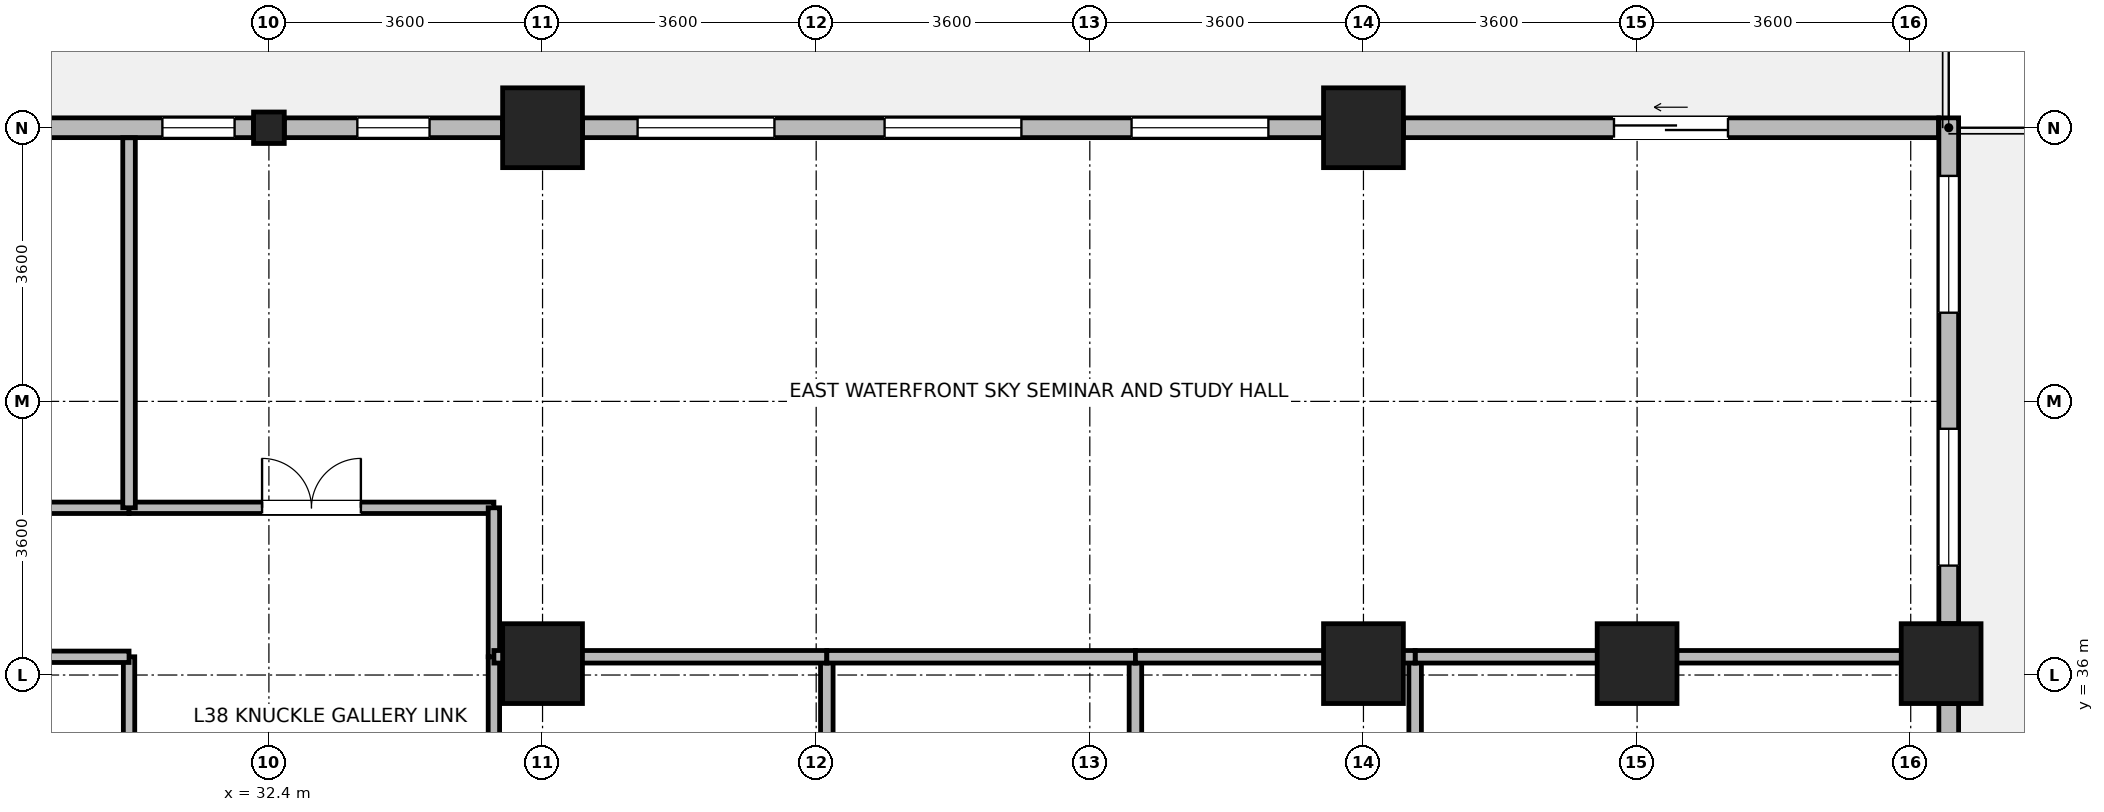
"""IFC4 building model, lengths in metres.
Left out: names, types, materials, properties, quantities, classifications, styles, units other than length and angle.
Written with IfcOpenShell. Run it as: python <this file> out.ifc"""

import sys

from ifc_helpers import new_model, si_unit, direction, frame, frame_2d, origin, origin_2d, place, context, subcontext, project, spatial, rectangle, i_section, extrude, source, transform, mapped, element, fill, save


model = new_model("IFC4")
c1 = context("Model", 3, precision=1e-05, world=origin(), true_north=direction((0.0, 1.0)))
c2 = subcontext(c1, "Body", "Model", "MODEL_VIEW")
j1 = project(units=[si_unit("LENGTHUNIT", "METRE"), si_unit("PLANEANGLEUNIT", "RADIAN")], contexts=[c1])
p1 = place(None, origin())
s1 = spatial("IfcSite", under=j1, at=p1, CompositionType="ELEMENT")
p2 = place(p1, origin())
s2 = spatial("IfcBuilding", under=s1, at=p2, CompositionType="ELEMENT")
p3 = place(p2, frame((0.0, 0.0, 151.3)))
s3 = spatial("IfcBuildingStorey", under=s2, at=p3, CompositionType="ELEMENT", Elevation=151.3)
m1 = source(origin(), c2, "Body", "SweptSolid", [
    extrude(rectangle(XDim=1.05, YDim=1.05, at=origin_2d()), origin(), (0.0, 0.0, 1.0), 3.7),
])
for number, where, z_axis, x_axis in (
    (1, (36.0, 43.2, 0.0), (0.0, 0.0, 1.0), (1.0, 0.0, 0.0)),
    (2, (36.0, 36.15, 0.0), (0.0, 0.0, 1.0), (1.0, 0.0, 0.0)),
    (3, (46.8, 36.15, 0.0), (0.0, 0.0, 1.0), (1.0, 0.0, 0.0)),
    (4, (46.8, 43.2, 0.0), (0.0, 0.0, 1.0), (1.0, 0.0, 0.0)),
    (5, (50.4, 36.15, 0.0), (0.0, 0.0, 1.0), (1.0, 0.0, 0.0)),
    (6, (54.4, 36.15, 0.0), (0.0, 0.0, 1.0), (1.0, 0.0, 0.0)),
):
    element("IfcColumn", number, at=place(p3, frame(where, z_axis=z_axis, x_axis=x_axis)), inside=s3, PredefinedType="COLUMN", context=c2, shape_type="MappedRepresentation", body=[
        mapped(m1, transform((0.0, 0.0, 0.0), x_axis=(1.0, 0.0, 0.0), y_axis=(0.0, 1.0, 0.0), z_axis=(0.0, 0.0, 1.0), scale=1.0)),
    ])
m2 = source(origin(), c2, "Body", "SweptSolid", [
    extrude(i_section(OverallWidth=0.404, OverallDepth=0.414, WebThickness=0.021, FlangeThickness=0.028, FilletRadius=0.015, at=origin_2d()), origin(), (0.0, 0.0, 1.0), 3.7),
])
p4 = place(p3, frame((32.4, 43.2, 0.0), z_axis=(0.0, 0.0, 1.0), x_axis=(1.0, 0.0, 0.0)))
e7 = element("IfcColumn", 7, at=p4, inside=s3, PredefinedType="COLUMN", context=c2, shape_type="MappedRepresentation", body=[
    mapped(m2, transform((0.0, 0.0, 0.0), x_axis=(1.0, 0.0, 0.0), y_axis=(0.0, 1.0, 0.0), z_axis=(0.0, 0.0, 1.0), scale=1.0)),
])
p5 = place(p3, frame((54.5, 35.624, 0.0), z_axis=(0.0, 0.0, 1.0), x_axis=(0.0, -1.0, 0.0)))
e8 = element("IfcWall", 8, at=p5, inside=s3, PredefinedType="STANDARD", context=c2, shape_type="SweptSolid", body=[
    extrude(rectangle(XDim=6.448, YDim=0.26, at=frame_2d((3.224, 0.0))), origin(), (0.0, 0.0, 1.0), 2.99),
])
p6 = place(p5, frame((0.712, 0.0, 0.85)))
e9 = element("IfcOpeningElement", 9, at=p6, cuts=e8, PredefinedType="OPENING", context=c2, shape_type="SweptSolid", body=[
    extrude(rectangle(XDim=1.8, YDim=1.85, at=frame_2d((0.9, 0.925))), frame((0.0, 0.14, 0.0), z_axis=(0.0, -1.0, 0.0), x_axis=(1.0, 0.0, 0.0)), (0.0, 0.0, 1.0), 0.28),
])
p7 = place(p5, frame((3.936, 0.0, 0.85)))
e10 = element("IfcOpeningElement", 10, at=p7, cuts=e8, PredefinedType="OPENING", context=c2, shape_type="SweptSolid", body=[
    extrude(rectangle(XDim=1.8, YDim=1.85, at=frame_2d((0.9, 0.925))), frame((0.0, 0.14, 0.0), z_axis=(0.0, -1.0, 0.0), x_axis=(1.0, 0.0, 0.0)), (0.0, 0.0, 1.0), 0.28),
])
p8 = place(p3, frame((54.5, 43.33, 0.0), z_axis=(0.0, 0.0, 1.0), x_axis=(0.0, -1.0, 0.0)))
e11 = element("IfcWall", 11, at=p8, inside=s3, PredefinedType="STANDARD", context=c2, shape_type="SweptSolid", body=[
    extrude(rectangle(XDim=6.654, YDim=0.26, at=frame_2d((3.327, 0.0))), origin(), (0.0, 0.0, 1.0), 3.44),
])
p9 = place(p8, frame((0.763, 0.0, 0.85)))
e12 = element("IfcOpeningElement", 12, at=p9, cuts=e11, PredefinedType="OPENING", context=c2, shape_type="SweptSolid", body=[
    extrude(rectangle(XDim=1.8, YDim=1.85, at=frame_2d((0.9, 0.925))), frame((0.0, 0.14, 0.0), z_axis=(0.0, -1.0, 0.0), x_axis=(1.0, 0.0, 0.0)), (0.0, 0.0, 1.0), 0.28),
])
p10 = place(p8, frame((4.091, 0.0, 0.85)))
e13 = element("IfcOpeningElement", 13, at=p10, cuts=e11, PredefinedType="OPENING", context=c2, shape_type="SweptSolid", body=[
    extrude(rectangle(XDim=1.8, YDim=1.85, at=frame_2d((0.9, 0.925))), frame((0.0, 0.14, 0.0), z_axis=(0.0, -1.0, 0.0), x_axis=(1.0, 0.0, 0.0)), (0.0, 0.0, 1.0), 0.28),
])
p11 = place(p3, frame((47.326, 43.2, 0.0), z_axis=(0.0, 0.0, 1.0), x_axis=(1.0, 0.0, 0.0)))
e14 = element("IfcWall", 14, at=p11, inside=s3, PredefinedType="STANDARD", context=c2, shape_type="SweptSolid", body=[
    extrude(rectangle(XDim=7.039, YDim=0.26, at=frame_2d((3.52, 0.0))), origin(), (0.0, 0.0, 1.0), 3.44),
])
p12 = place(p11, frame((2.77, 0.0, 0.0)))
e15 = element("IfcOpeningElement", 15, at=p12, cuts=e14, PredefinedType="OPENING", context=c2, shape_type="SweptSolid", body=[
    extrude(rectangle(XDim=1.5, YDim=2.15, at=frame_2d((0.75, 1.075))), frame((0.0, 0.14, 0.0), z_axis=(0.0, -1.0, 0.0), x_axis=(1.0, 0.0, 0.0)), (0.0, 0.0, 1.0), 0.28),
])
p13 = place(p3, frame((36.526, 43.2, 0.0), z_axis=(0.0, 0.0, 1.0), x_axis=(1.0, 0.0, 0.0)))
e16 = element("IfcWall", 16, at=p13, inside=s3, PredefinedType="STANDARD", context=c2, shape_type="SweptSolid", body=[
    extrude(rectangle(XDim=9.748, YDim=0.26, at=frame_2d((4.874, 0.0))), origin(), (0.0, 0.0, 1.0), 2.99),
])
p14 = place(p13, frame((0.725, 0.0, 0.85)))
e17 = element("IfcOpeningElement", 17, at=p14, cuts=e16, PredefinedType="OPENING", context=c2, shape_type="SweptSolid", body=[
    extrude(rectangle(XDim=1.8, YDim=1.85, at=frame_2d((0.9, 0.925))), frame((0.0, 0.14, 0.0), z_axis=(0.0, -1.0, 0.0), x_axis=(1.0, 0.0, 0.0)), (0.0, 0.0, 1.0), 0.28),
])
p15 = place(p13, frame((3.974, 0.0, 0.85)))
e18 = element("IfcOpeningElement", 18, at=p15, cuts=e16, PredefinedType="OPENING", context=c2, shape_type="SweptSolid", body=[
    extrude(rectangle(XDim=1.8, YDim=1.85, at=frame_2d((0.9, 0.925))), frame((0.0, 0.14, 0.0), z_axis=(0.0, -1.0, 0.0), x_axis=(1.0, 0.0, 0.0)), (0.0, 0.0, 1.0), 0.28),
])
p16 = place(p13, frame((7.223, 0.0, 0.85)))
e19 = element("IfcOpeningElement", 19, at=p16, cuts=e16, PredefinedType="OPENING", context=c2, shape_type="SweptSolid", body=[
    extrude(rectangle(XDim=1.8, YDim=1.85, at=frame_2d((0.9, 0.925))), frame((0.0, 0.14, 0.0), z_axis=(0.0, -1.0, 0.0), x_axis=(1.0, 0.0, 0.0)), (0.0, 0.0, 1.0), 0.28),
])
p17 = place(p3, frame((32.603, 43.2, 0.0), z_axis=(0.0, 0.0, 1.0), x_axis=(1.0, 0.0, 0.0)))
e20 = element("IfcWall", 20, at=p17, inside=s3, PredefinedType="STANDARD", context=c2, shape_type="SweptSolid", body=[
    extrude(rectangle(XDim=2.871, YDim=0.26, at=frame_2d((1.436, 0.0))), origin(), (0.0, 0.0, 1.0), 2.99),
])
p18 = place(p17, frame((0.96, 0.0, 0.85)))
e21 = element("IfcOpeningElement", 21, at=p18, cuts=e20, PredefinedType="OPENING", context=c2, shape_type="SweptSolid", body=[
    extrude(rectangle(XDim=0.95, YDim=1.75, at=frame_2d((0.475, 0.875))), frame((0.0, 0.14, 0.0), z_axis=(0.0, -1.0, 0.0), x_axis=(1.0, 0.0, 0.0)), (0.0, 0.0, 1.0), 0.28),
])
p19 = place(p3, frame((29.326, 43.2, 0.0), z_axis=(0.0, 0.0, 1.0), x_axis=(1.0, 0.0, 0.0)))
e22 = element("IfcWall", 22, at=p19, inside=s3, PredefinedType="STANDARD", context=c2, shape_type="SweptSolid", body=[
    extrude(rectangle(XDim=2.871, YDim=0.26, at=frame_2d((1.436, 0.0))), origin(), (0.0, 0.0, 1.0), 2.99),
])
p20 = place(p19, frame((1.673, 0.0, 0.85)))
e23 = element("IfcOpeningElement", 23, at=p20, cuts=e22, PredefinedType="OPENING", context=c2, shape_type="SweptSolid", body=[
    extrude(rectangle(XDim=0.95, YDim=1.75, at=frame_2d((0.475, 0.875))), frame((0.0, 0.14, 0.0), z_axis=(0.0, -1.0, 0.0), x_axis=(1.0, 0.0, 0.0)), (0.0, 0.0, 1.0), 0.28),
])
p21 = place(p3, frame((35.36, 28.56, 0.0), z_axis=(0.0, 0.0, 1.0), x_axis=(0.0, 1.0, 0.0)))
e24 = element("IfcWall", 24, at=p21, inside=s3, PredefinedType="PARTITIONING", context=c2, shape_type="SweptSolid", body=[
    extrude(rectangle(XDim=7.68, YDim=0.15, at=frame_2d((3.84, 0.0))), origin(), (0.0, 0.0, 1.0), 3.44),
])
p22 = place(p21, frame((3.19, 0.0, 0.0)))
e25 = element("IfcOpeningElement", 25, at=p22, cuts=e24, PredefinedType="OPENING", context=c2, shape_type="SweptSolid", body=[
    extrude(rectangle(XDim=1.3, YDim=2.12, at=frame_2d((0.65, 1.06))), frame((0.0, 0.085, 0.0), z_axis=(0.0, -1.0, 0.0), x_axis=(1.0, 0.0, 0.0)), (0.0, 0.0, 1.0), 0.17),
])
p23 = place(p3, frame((23.48, 38.2, 0.0), z_axis=(0.0, 0.0, 1.0), x_axis=(1.0, 0.0, 0.0)))
e26 = element("IfcWall", 26, at=p23, inside=s3, PredefinedType="PARTITIONING", context=c2, shape_type="SweptSolid", body=[
    extrude(rectangle(XDim=7.08, YDim=0.15, at=frame_2d((3.54, 0.0))), origin(), (0.0, 0.0, 1.0), 3.44),
])
p24 = place(p23, frame((2.89, 0.0, 0.0)))
e27 = element("IfcOpeningElement", 27, at=p24, cuts=e26, PredefinedType="OPENING", context=c2, shape_type="SweptSolid", body=[
    extrude(rectangle(XDim=1.3, YDim=2.12, at=frame_2d((0.65, 1.06))), frame((0.0, 0.085, 0.0), z_axis=(0.0, -1.0, 0.0), x_axis=(1.0, 0.0, 0.0)), (0.0, 0.0, 1.0), 0.17),
])
p25 = place(p3, frame((30.56, 38.2, 0.0), z_axis=(0.0, 0.0, 1.0), x_axis=(1.0, 0.0, 0.0)))
e28 = element("IfcWall", 28, at=p25, inside=s3, PredefinedType="PARTITIONING", context=c2, shape_type="SweptSolid", body=[
    extrude(rectangle(XDim=4.8, YDim=0.15, at=frame_2d((2.4, 0.0))), origin(), (0.0, 0.0, 1.0), 3.44),
])
p26 = place(p25, frame((1.75, 0.0, 0.0)))
e29 = element("IfcOpeningElement", 29, at=p26, cuts=e28, PredefinedType="OPENING", context=c2, shape_type="SweptSolid", body=[
    extrude(rectangle(XDim=1.3, YDim=2.12, at=frame_2d((0.65, 1.06))), frame((0.0, 0.085, 0.0), z_axis=(0.0, -1.0, 0.0), x_axis=(1.0, 0.0, 0.0)), (0.0, 0.0, 1.0), 0.17),
])
p27 = place(p3, frame((30.56, 32.4, 0.0), z_axis=(0.0, 0.0, 1.0), x_axis=(0.0, 1.0, 0.0)))
e30 = element("IfcWall", 30, at=p27, inside=s3, PredefinedType="PARTITIONING", context=c2, shape_type="SweptSolid", body=[
    extrude(rectangle(XDim=3.84, YDim=0.15, at=frame_2d((1.92, 0.0))), origin(), (0.0, 0.0, 1.0), 3.44),
])
p28 = place(p27, frame((1.27, 0.0, 0.0)))
e31 = element("IfcOpeningElement", 31, at=p28, cuts=e30, PredefinedType="OPENING", context=c2, shape_type="SweptSolid", body=[
    extrude(rectangle(XDim=1.3, YDim=2.12, at=frame_2d((0.65, 1.06))), frame((0.0, 0.085, 0.0), z_axis=(0.0, -1.0, 0.0), x_axis=(1.0, 0.0, 0.0)), (0.0, 0.0, 1.0), 0.17),
])
p29 = place(p3, frame((35.36, 36.24, 0.0), z_axis=(0.0, 0.0, 1.0), x_axis=(0.0, 1.0, 0.0)))
e32 = element("IfcWall", 32, at=p29, inside=s3, PredefinedType="PARTITIONING", context=c2, shape_type="SweptSolid", body=[
    extrude(rectangle(XDim=1.96, YDim=0.15, at=frame_2d((0.98, 0.0))), origin(), (0.0, 0.0, 1.0), 3.44),
])
p30 = place(p3, frame((29.325, 36.24, 0.0), z_axis=(0.0, 0.0, 1.0), x_axis=(1.0, 0.0, 0.0)))
e33 = element("IfcWall", 33, at=p30, inside=s3, PredefinedType="PARTITIONING", context=c2, shape_type="SweptSolid", body=[
    extrude(rectangle(XDim=1.235, YDim=0.15, at=frame_2d((0.618, 0.0))), origin(), (0.0, 0.0, 1.0), 2.84),
])
for number, where, z_axis, x_axis in (
    (34, (39.74, 28.56, 0.0), (0.0, 0.0, 1.0), (0.0, 1.0, 0.0)),
    (35, (43.8, 28.56, 0.0), (0.0, 0.0, 1.0), (0.0, 1.0, 0.0)),
    (36, (47.48, 28.56, 0.0), (0.0, 0.0, 1.0), (0.0, 1.0, 0.0)),
):
    element("IfcWall", number, at=place(p3, frame(where, z_axis=z_axis, x_axis=x_axis)), inside=s3, PredefinedType="PARTITIONING", context=c2, shape_type="SweptSolid", body=[
        extrude(rectangle(XDim=7.68, YDim=0.165, at=frame_2d((3.84, 0.0))), origin(), (0.0, 0.0, 1.0), 3.44),
    ])
p31 = place(p3, frame((47.48, 36.24, 0.0), z_axis=(0.0, 0.0, 1.0), x_axis=(1.0, 0.0, 0.0)))
e37 = element("IfcWall", 37, at=p31, inside=s3, PredefinedType="PARTITIONING", context=c2, shape_type="SweptSolid", body=[
    extrude(rectangle(XDim=6.888, YDim=0.165, at=frame_2d((3.444, 0.0))), origin(), (0.0, 0.0, 1.0), 2.84),
])
p32 = place(p3, frame((30.56, 38.2, 0.0), z_axis=(0.0, 0.0, 1.0), x_axis=(0.0, 1.0, 0.0)))
e38 = element("IfcWall", 38, at=p32, inside=s3, PredefinedType="PARTITIONING", context=c2, shape_type="SweptSolid", body=[
    extrude(rectangle(XDim=4.868, YDim=0.165, at=frame_2d((2.434, 0.0))), origin(), (0.0, 0.0, 1.0), 3.44),
])
p33 = place(p3, frame((35.36, 36.24, 0.0), z_axis=(0.0, 0.0, 1.0), x_axis=(1.0, 0.0, 0.0)))
e39 = element("IfcWall", 39, at=p33, inside=s3, PredefinedType="PARTITIONING", context=c2, shape_type="SweptSolid", body=[
    extrude(rectangle(XDim=4.38, YDim=0.165, at=frame_2d((2.19, 0.0))), origin(), (0.0, 0.0, 1.0), 2.84),
])
p34 = place(p3, frame((39.74, 36.24, 0.0), z_axis=(0.0, 0.0, 1.0), x_axis=(1.0, 0.0, 0.0)))
e40 = element("IfcWall", 40, at=p34, inside=s3, PredefinedType="PARTITIONING", context=c2, shape_type="SweptSolid", body=[
    extrude(rectangle(XDim=4.06, YDim=0.165, at=frame_2d((2.03, 0.0))), origin(), (0.0, 0.0, 1.0), 2.84),
])
p35 = place(p3, frame((43.8, 36.24, 0.0), z_axis=(0.0, 0.0, 1.0), x_axis=(1.0, 0.0, 0.0)))
e41 = element("IfcWall", 41, at=p35, inside=s3, PredefinedType="PARTITIONING", context=c2, shape_type="SweptSolid", body=[
    extrude(rectangle(XDim=3.68, YDim=0.165, at=frame_2d((1.84, 0.0))), origin(), (0.0, 0.0, 1.0), 2.84),
])
p36 = place(p9, origin())
e42 = element("IfcWindow", 42, at=p36, inside=s3, PartitioningType="SINGLE_PANEL", PredefinedType="WINDOW", context=c2, shape_type="SweptSolid", body=[
    extrude(rectangle(XDim=1.8, YDim=1.85, at=frame_2d((0.9, 0.925))), frame((0.0, 0.03, 0.0), z_axis=(0.0, -1.0, 0.0), x_axis=(1.0, 0.0, 0.0)), (0.0, 0.0, 1.0), 0.06),
])
fill(e12, e42)
p37 = place(p10, origin())
e43 = element("IfcWindow", 43, at=p37, inside=s3, PartitioningType="SINGLE_PANEL", PredefinedType="WINDOW", context=c2, shape_type="SweptSolid", body=[
    extrude(rectangle(XDim=1.8, YDim=1.85, at=frame_2d((0.9, 0.925))), frame((0.0, 0.03, 0.0), z_axis=(0.0, -1.0, 0.0), x_axis=(1.0, 0.0, 0.0)), (0.0, 0.0, 1.0), 0.06),
])
fill(e13, e43)
p38 = place(p12, origin())
e44 = element("IfcDoor", 44, at=p38, inside=s3, OperationType="SLIDING_TO_LEFT", PredefinedType="DOOR", context=c2, shape_type="SweptSolid", body=[
    extrude(rectangle(XDim=1.5, YDim=2.15, at=frame_2d((0.75, 1.075))), frame((0.0, 0.025, 0.0), z_axis=(0.0, -1.0, 0.0), x_axis=(1.0, 0.0, 0.0)), (0.0, 0.0, 1.0), 0.05),
])
fill(e15, e44)
p39 = place(p14, origin())
e45 = element("IfcWindow", 45, at=p39, inside=s3, PartitioningType="SINGLE_PANEL", PredefinedType="WINDOW", context=c2, shape_type="SweptSolid", body=[
    extrude(rectangle(XDim=1.8, YDim=1.85, at=frame_2d((0.9, 0.925))), frame((0.0, 0.03, 0.0), z_axis=(0.0, -1.0, 0.0), x_axis=(1.0, 0.0, 0.0)), (0.0, 0.0, 1.0), 0.06),
])
fill(e17, e45)
p40 = place(p15, origin())
e46 = element("IfcWindow", 46, at=p40, inside=s3, PartitioningType="SINGLE_PANEL", PredefinedType="WINDOW", context=c2, shape_type="SweptSolid", body=[
    extrude(rectangle(XDim=1.8, YDim=1.85, at=frame_2d((0.9, 0.925))), frame((0.0, 0.03, 0.0), z_axis=(0.0, -1.0, 0.0), x_axis=(1.0, 0.0, 0.0)), (0.0, 0.0, 1.0), 0.06),
])
fill(e18, e46)
p41 = place(p16, origin())
e47 = element("IfcWindow", 47, at=p41, inside=s3, PartitioningType="SINGLE_PANEL", PredefinedType="WINDOW", context=c2, shape_type="SweptSolid", body=[
    extrude(rectangle(XDim=1.8, YDim=1.85, at=frame_2d((0.9, 0.925))), frame((0.0, 0.03, 0.0), z_axis=(0.0, -1.0, 0.0), x_axis=(1.0, 0.0, 0.0)), (0.0, 0.0, 1.0), 0.06),
])
fill(e19, e47)
p42 = place(p18, origin())
e48 = element("IfcWindow", 48, at=p42, inside=s3, PartitioningType="SINGLE_PANEL", PredefinedType="WINDOW", context=c2, shape_type="SweptSolid", body=[
    extrude(rectangle(XDim=0.95, YDim=1.75, at=frame_2d((0.475, 0.875))), frame((0.0, 0.03, 0.0), z_axis=(0.0, -1.0, 0.0), x_axis=(1.0, 0.0, 0.0)), (0.0, 0.0, 1.0), 0.06),
])
fill(e21, e48)
p43 = place(p20, origin())
e49 = element("IfcWindow", 49, at=p43, inside=s3, PartitioningType="SINGLE_PANEL", PredefinedType="WINDOW", context=c2, shape_type="SweptSolid", body=[
    extrude(rectangle(XDim=0.95, YDim=1.75, at=frame_2d((0.475, 0.875))), frame((0.0, 0.03, 0.0), z_axis=(0.0, -1.0, 0.0), x_axis=(1.0, 0.0, 0.0)), (0.0, 0.0, 1.0), 0.06),
])
fill(e23, e49)
p44 = place(p26, origin())
e50 = element("IfcDoor", 50, at=p44, inside=s3, OperationType="DOUBLE_DOOR_SINGLE_SWING", PredefinedType="DOOR", context=c2, shape_type="SweptSolid", body=[
    extrude(rectangle(XDim=1.3, YDim=2.12, at=frame_2d((0.65, 1.06))), frame((0.0, 0.025, 0.0), z_axis=(0.0, -1.0, 0.0), x_axis=(1.0, 0.0, 0.0)), (0.0, 0.0, 1.0), 0.05),
])
fill(e29, e50)
save(model, sys.argv[1])
